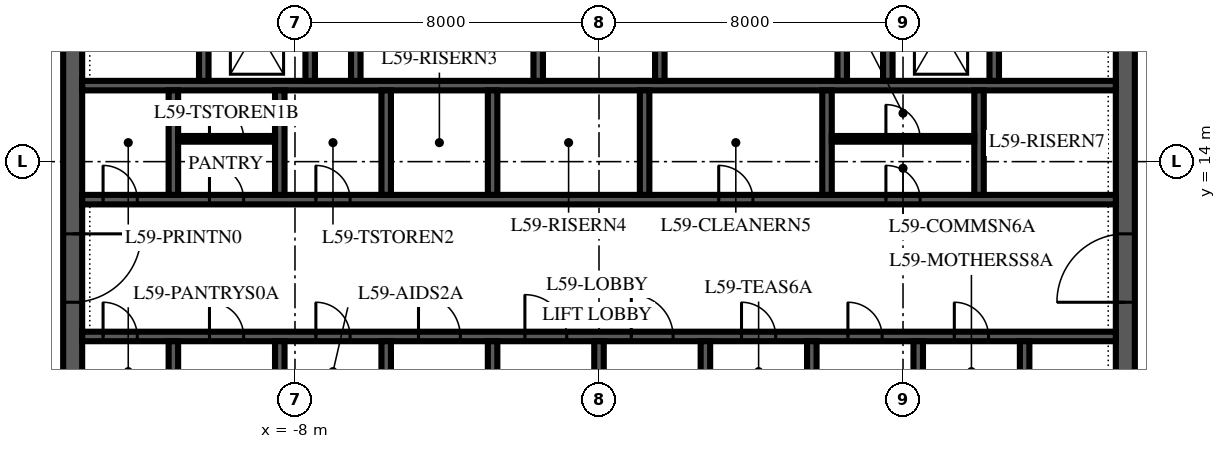
"""IFC4 building model, lengths in metres.
Left out: names, types, materials, properties, quantities, classifications, styles, units other than length and angle.
Written with IfcOpenShell. Run it as: python <this file> out.ifc"""

import sys

from ifc_helpers import new_model, si_unit, direction, frame, frame_2d, origin, place, context, subcontext, project, spatial, polyline, rectangle, outline, extrude, element, fill, save


model = new_model("IFC4")
c1 = context("Model", 3, precision=1e-05, world=origin(), true_north=direction((0.0, 1.0)))
c2 = subcontext(c1, "Body", "Model", "MODEL_VIEW")
j1 = project(units=[si_unit("LENGTHUNIT", "METRE"), si_unit("PLANEANGLEUNIT", "RADIAN")], contexts=[c1])
p1 = place(None, origin())
s1 = spatial("IfcSite", under=j1, at=p1, CompositionType="ELEMENT")
p2 = place(p1, origin())
s2 = spatial("IfcBuilding", under=s1, at=p2, CompositionType="ELEMENT")
p3 = place(p2, frame((0.0, 0.0, 256.0)))
s3 = spatial("IfcBuildingStorey", under=s2, at=p3, CompositionType="ELEMENT", Elevation=256.0)
p4 = place(p3, frame((13.85, 6.15, 0.0), z_axis=(0.0, 0.0, 1.0), x_axis=(0.0, 1.0, 0.0)))
e1 = element("IfcWall", 1, at=p4, inside=s3, PredefinedType="SHEAR", context=c2, shape_type="SweptSolid", body=[
    extrude(outline(polyline([(0.0, -0.25), (17.7, -0.25), (17.7, 0.0), (17.45, 0.0), (17.45, 0.25), (0.25, 0.25), (0.25, 0.0), (0.0, 0.0), (0.0, -0.25)])), origin(), (0.0, 0.0, 1.0), 4.0),
])
p5 = place(p4, frame((4.15, 0.0, 0.0)))
e2 = element("IfcOpeningElement", 2, at=p5, cuts=e1, PredefinedType="OPENING", context=c2, shape_type="SweptSolid", body=[
    extrude(rectangle(XDim=1.8, YDim=2.4, at=frame_2d((0.9, 1.2))), frame((0.0, 0.265, 0.0), z_axis=(0.0, -1.0, 0.0), x_axis=(1.0, 0.0, 0.0)), (0.0, 0.0, 1.0), 0.53),
])
p6 = place(p3, frame((-13.85, 23.85, 0.0), z_axis=(0.0, 0.0, 1.0), x_axis=(0.0, -1.0, 0.0)))
e3 = element("IfcWall", 3, at=p6, inside=s3, PredefinedType="SHEAR", context=c2, shape_type="SweptSolid", body=[
    extrude(outline(polyline([(0.0, -0.25), (17.7, -0.25), (17.7, 0.0), (17.45, 0.0), (17.45, 0.25), (0.25, 0.25), (0.25, 0.0), (0.0, 0.0), (0.0, -0.25)])), origin(), (0.0, 0.0, 1.0), 4.0),
])
p7 = place(p6, frame((11.75, 0.0, 0.0)))
e4 = element("IfcOpeningElement", 4, at=p7, cuts=e3, PredefinedType="OPENING", context=c2, shape_type="SweptSolid", body=[
    extrude(rectangle(XDim=1.8, YDim=2.4, at=frame_2d((0.9, 1.2))), frame((0.0, 0.265, 0.0), z_axis=(0.0, -1.0, 0.0), x_axis=(1.0, 0.0, 0.0)), (0.0, 0.0, 1.0), 0.53),
])
p8 = place(p3, frame((-13.6, 9.4, 0.0), z_axis=(0.0, 0.0, 1.0), x_axis=(1.0, 0.0, 0.0)))
e5 = element("IfcWall", 5, at=p8, inside=s3, PredefinedType="SHEAR", context=c2, shape_type="SweptSolid", body=[
    extrude(rectangle(XDim=27.2, YDim=0.25, at=frame_2d((13.6, 0.0))), origin(), (0.0, 0.0, 1.0), 4.0),
])
p9 = place(p8, frame((8.85, 0.0, 0.0)))
e6 = element("IfcOpeningElement", 6, at=p9, cuts=e5, PredefinedType="OPENING", context=c2, shape_type="SweptSolid", body=[
    extrude(rectangle(XDim=1.1, YDim=2.1, at=frame_2d((0.55, 1.05))), frame((0.0, 0.14, 0.0), z_axis=(0.0, -1.0, 0.0), x_axis=(1.0, 0.0, 0.0)), (0.0, 0.0, 1.0), 0.28),
])
p10 = place(p8, frame((11.65, 0.0, 0.0)))
e7 = element("IfcOpeningElement", 7, at=p10, cuts=e5, PredefinedType="OPENING", context=c2, shape_type="SweptSolid", body=[
    extrude(rectangle(XDim=1.1, YDim=2.1, at=frame_2d((0.55, 1.05))), frame((0.0, 0.14, 0.0), z_axis=(0.0, -1.0, 0.0), x_axis=(1.0, 0.0, 0.0)), (0.0, 0.0, 1.0), 0.28),
])
p11 = place(p8, frame((14.45, 0.0, 0.0)))
e8 = element("IfcOpeningElement", 8, at=p11, cuts=e5, PredefinedType="OPENING", context=c2, shape_type="SweptSolid", body=[
    extrude(rectangle(XDim=1.1, YDim=2.1, at=frame_2d((0.55, 1.05))), frame((0.0, 0.14, 0.0), z_axis=(0.0, -1.0, 0.0), x_axis=(1.0, 0.0, 0.0)), (0.0, 0.0, 1.0), 0.28),
])
p12 = place(p8, frame((0.55, 0.0, 0.0)))
e9 = element("IfcOpeningElement", 9, at=p12, cuts=e5, PredefinedType="OPENING", context=c2, shape_type="SweptSolid", body=[
    extrude(rectangle(XDim=0.9, YDim=2.1, at=frame_2d((0.45, 1.05))), frame((0.0, 0.14, 0.0), z_axis=(0.0, -1.0, 0.0), x_axis=(1.0, 0.0, 0.0)), (0.0, 0.0, 1.0), 0.28),
])
p13 = place(p8, frame((3.35, 0.0, 0.0)))
e10 = element("IfcOpeningElement", 10, at=p13, cuts=e5, PredefinedType="OPENING", context=c2, shape_type="SweptSolid", body=[
    extrude(rectangle(XDim=0.9, YDim=2.1, at=frame_2d((0.45, 1.05))), frame((0.0, 0.14, 0.0), z_axis=(0.0, -1.0, 0.0), x_axis=(1.0, 0.0, 0.0)), (0.0, 0.0, 1.0), 0.28),
])
p14 = place(p8, frame((6.15, 0.0, 0.0)))
e11 = element("IfcOpeningElement", 11, at=p14, cuts=e5, PredefinedType="OPENING", context=c2, shape_type="SweptSolid", body=[
    extrude(rectangle(XDim=0.9, YDim=2.1, at=frame_2d((0.45, 1.05))), frame((0.0, 0.14, 0.0), z_axis=(0.0, -1.0, 0.0), x_axis=(1.0, 0.0, 0.0)), (0.0, 0.0, 1.0), 0.28),
])
p15 = place(p8, frame((17.35, 0.0, 0.0)))
e12 = element("IfcOpeningElement", 12, at=p15, cuts=e5, PredefinedType="OPENING", context=c2, shape_type="SweptSolid", body=[
    extrude(rectangle(XDim=0.9, YDim=2.1, at=frame_2d((0.45, 1.05))), frame((0.0, 0.14, 0.0), z_axis=(0.0, -1.0, 0.0), x_axis=(1.0, 0.0, 0.0)), (0.0, 0.0, 1.0), 0.28),
])
p16 = place(p8, frame((20.15, 0.0, 0.0)))
e13 = element("IfcOpeningElement", 13, at=p16, cuts=e5, PredefinedType="OPENING", context=c2, shape_type="SweptSolid", body=[
    extrude(rectangle(XDim=0.9, YDim=2.1, at=frame_2d((0.45, 1.05))), frame((0.0, 0.14, 0.0), z_axis=(0.0, -1.0, 0.0), x_axis=(1.0, 0.0, 0.0)), (0.0, 0.0, 1.0), 0.28),
])
p17 = place(p8, frame((22.95, 0.0, 0.0)))
e14 = element("IfcOpeningElement", 14, at=p17, cuts=e5, PredefinedType="OPENING", context=c2, shape_type="SweptSolid", body=[
    extrude(rectangle(XDim=0.9, YDim=2.1, at=frame_2d((0.45, 1.05))), frame((0.0, 0.14, 0.0), z_axis=(0.0, -1.0, 0.0), x_axis=(1.0, 0.0, 0.0)), (0.0, 0.0, 1.0), 0.28),
])
p18 = place(p3, frame((-13.6, 13.0, 0.0), z_axis=(0.0, 0.0, 1.0), x_axis=(1.0, 0.0, 0.0)))
e15 = element("IfcWall", 15, at=p18, inside=s3, PredefinedType="SHEAR", context=c2, shape_type="SweptSolid", body=[
    extrude(rectangle(XDim=27.2, YDim=0.25, at=frame_2d((13.6, 0.0))), origin(), (0.0, 0.0, 1.0), 4.0),
])
p19 = place(p18, frame((16.75, 0.0, 0.0)))
e16 = element("IfcOpeningElement", 16, at=p19, cuts=e15, PredefinedType="OPENING", context=c2, shape_type="SweptSolid", body=[
    extrude(rectangle(XDim=0.9, YDim=2.1, at=frame_2d((0.45, 1.05))), frame((0.0, 0.14, 0.0), z_axis=(0.0, -1.0, 0.0), x_axis=(1.0, 0.0, 0.0)), (0.0, 0.0, 1.0), 0.28),
])
p20 = place(p18, frame((21.15, 0.0, 0.0)))
e17 = element("IfcOpeningElement", 17, at=p20, cuts=e15, PredefinedType="OPENING", context=c2, shape_type="SweptSolid", body=[
    extrude(rectangle(XDim=0.9, YDim=2.1, at=frame_2d((0.45, 1.05))), frame((0.0, 0.14, 0.0), z_axis=(0.0, -1.0, 0.0), x_axis=(1.0, 0.0, 0.0)), (0.0, 0.0, 1.0), 0.28),
])
p21 = place(p18, frame((0.55, 0.0, 0.0)))
e18 = element("IfcOpeningElement", 18, at=p21, cuts=e15, PredefinedType="OPENING", context=c2, shape_type="SweptSolid", body=[
    extrude(rectangle(XDim=0.9, YDim=2.1, at=frame_2d((0.45, 1.05))), frame((0.0, 0.14, 0.0), z_axis=(0.0, -1.0, 0.0), x_axis=(1.0, 0.0, 0.0)), (0.0, 0.0, 1.0), 0.28),
])
p22 = place(p18, frame((3.35, 0.0, 0.0)))
e19 = element("IfcOpeningElement", 19, at=p22, cuts=e15, PredefinedType="OPENING", context=c2, shape_type="SweptSolid", body=[
    extrude(rectangle(XDim=0.9, YDim=2.1, at=frame_2d((0.45, 1.05))), frame((0.0, 0.14, 0.0), z_axis=(0.0, -1.0, 0.0), x_axis=(1.0, 0.0, 0.0)), (0.0, 0.0, 1.0), 0.28),
])
p23 = place(p18, frame((6.15, 0.0, 0.0)))
e20 = element("IfcOpeningElement", 20, at=p23, cuts=e15, PredefinedType="OPENING", context=c2, shape_type="SweptSolid", body=[
    extrude(rectangle(XDim=0.9, YDim=2.1, at=frame_2d((0.45, 1.05))), frame((0.0, 0.14, 0.0), z_axis=(0.0, -1.0, 0.0), x_axis=(1.0, 0.0, 0.0)), (0.0, 0.0, 1.0), 0.28),
])
p24 = place(p3, frame((-13.6, 16.0, 0.0), z_axis=(0.0, 0.0, 1.0), x_axis=(1.0, 0.0, 0.0)))
e21 = element("IfcWall", 21, at=p24, inside=s3, PredefinedType="SHEAR", context=c2, shape_type="SweptSolid", body=[
    extrude(rectangle(XDim=27.2, YDim=0.25, at=frame_2d((13.6, 0.0))), origin(), (0.0, 0.0, 1.0), 4.0),
])
for number, where, z_axis, x_axis in (
    (22, (-11.2, 6.4, 0.0), (0.0, 0.0, 1.0), (0.0, 1.0, 0.0)),
    (23, (-8.4, 6.4, 0.0), (0.0, 0.0, 1.0), (0.0, 1.0, 0.0)),
    (24, (-5.6, 6.4, 0.0), (0.0, 0.0, 1.0), (0.0, 1.0, 0.0)),
    (25, (-2.8, 6.4, 0.0), (0.0, 0.0, 1.0), (0.0, 1.0, 0.0)),
    (26, (0.0, 6.4, 0.0), (0.0, 0.0, 1.0), (0.0, 1.0, 0.0)),
    (27, (2.8, 6.4, 0.0), (0.0, 0.0, 1.0), (0.0, 1.0, 0.0)),
    (28, (5.6, 6.4, 0.0), (0.0, 0.0, 1.0), (0.0, 1.0, 0.0)),
    (29, (8.4, 6.4, 0.0), (0.0, 0.0, 1.0), (0.0, 1.0, 0.0)),
    (30, (11.2, 6.4, 0.0), (0.0, 0.0, 1.0), (0.0, 1.0, 0.0)),
):
    element("IfcWall", number, at=place(p3, frame(where, z_axis=z_axis, x_axis=x_axis)), inside=s3, PredefinedType="SHEAR", context=c2, shape_type="SweptSolid", body=[
        extrude(rectangle(XDim=2.875, YDim=0.25, at=frame_2d((1.438, 0.0))), origin(), (0.0, 0.0, 1.0), 4.0),
    ])
for number, where, z_axis, x_axis in (
    (31, (-11.2, 13.125, 0.0), (0.0, 0.0, 1.0), (0.0, 1.0, 0.0)),
    (32, (-8.4, 13.125, 0.0), (0.0, 0.0, 1.0), (0.0, 1.0, 0.0)),
    (33, (-5.6, 13.125, 0.0), (0.0, 0.0, 1.0), (0.0, 1.0, 0.0)),
    (34, (-2.8, 13.125, 0.0), (0.0, 0.0, 1.0), (0.0, 1.0, 0.0)),
    (35, (1.2, 13.125, 0.0), (0.0, 0.0, 1.0), (0.0, 1.0, 0.0)),
    (36, (6.0, 13.125, 0.0), (0.0, 0.0, 1.0), (0.0, 1.0, 0.0)),
    (37, (10.0, 13.125, 0.0), (0.0, 0.0, 1.0), (0.0, 1.0, 0.0)),
):
    element("IfcWall", number, at=place(p3, frame(where, z_axis=z_axis, x_axis=x_axis)), inside=s3, PredefinedType="SHEAR", context=c2, shape_type="SweptSolid", body=[
        extrude(rectangle(XDim=2.75, YDim=0.25, at=frame_2d((1.375, 0.0))), origin(), (0.0, 0.0, 1.0), 4.0),
    ])
p25 = place(p3, frame((-10.4, 16.125, 0.0), z_axis=(0.0, 0.0, 1.0), x_axis=(0.0, 1.0, 0.0)))
e38 = element("IfcWall", 38, at=p25, inside=s3, PredefinedType="SHEAR", context=c2, shape_type="SweptSolid", body=[
    extrude(rectangle(XDim=7.475, YDim=0.25, at=frame_2d((3.738, 0.0))), origin(), (0.0, 0.0, 1.0), 4.0),
])
p26 = place(p25, frame((6.275, 0.0, 0.0)))
e39 = element("IfcOpeningElement", 39, at=p26, cuts=e38, PredefinedType="OPENING", context=c2, shape_type="SweptSolid", body=[
    extrude(rectangle(XDim=1.0, YDim=2.1, at=frame_2d((0.5, 1.05))), frame((0.0, 0.14, 0.0), z_axis=(0.0, -1.0, 0.0), x_axis=(1.0, 0.0, 0.0)), (0.0, 0.0, 1.0), 0.28),
])
for number, where, z_axis, x_axis in (
    (40, (-6.4, 16.125, 0.0), (0.0, 0.0, 1.0), (0.0, 1.0, 0.0)),
    (41, (-1.6, 16.125, 0.0), (0.0, 0.0, 1.0), (0.0, 1.0, 0.0)),
    (42, (1.6, 16.125, 0.0), (0.0, 0.0, 1.0), (0.0, 1.0, 0.0)),
    (43, (6.4, 16.125, 0.0), (0.0, 0.0, 1.0), (0.0, 1.0, 0.0)),
):
    element("IfcWall", number, at=place(p3, frame(where, z_axis=z_axis, x_axis=x_axis)), inside=s3, PredefinedType="SHEAR", context=c2, shape_type="SweptSolid", body=[
        extrude(rectangle(XDim=7.475, YDim=0.25, at=frame_2d((3.738, 0.0))), origin(), (0.0, 0.0, 1.0), 4.0),
    ])
p27 = place(p3, frame((10.4, 16.125, 0.0), z_axis=(0.0, 0.0, 1.0), x_axis=(0.0, 1.0, 0.0)))
e44 = element("IfcWall", 44, at=p27, inside=s3, PredefinedType="SHEAR", context=c2, shape_type="SweptSolid", body=[
    extrude(rectangle(XDim=7.475, YDim=0.25, at=frame_2d((3.738, 0.0))), origin(), (0.0, 0.0, 1.0), 4.0),
])
p28 = place(p27, frame((6.275, 0.0, 0.0)))
e45 = element("IfcOpeningElement", 45, at=p28, cuts=e44, PredefinedType="OPENING", context=c2, shape_type="SweptSolid", body=[
    extrude(rectangle(XDim=1.0, YDim=2.1, at=frame_2d((0.5, 1.05))), frame((0.0, 0.14, 0.0), z_axis=(0.0, -1.0, 0.0), x_axis=(1.0, 0.0, 0.0)), (0.0, 0.0, 1.0), 0.28),
])
for number, where, z_axis, x_axis in (
    (46, (-7.6, 16.125, 0.0), (0.0, 0.0, 1.0), (0.0, 1.0, 0.0)),
    (47, (7.6, 16.125, 0.0), (0.0, 0.0, 1.0), (0.0, 1.0, 0.0)),
):
    element("IfcWall", number, at=place(p3, frame(where, z_axis=z_axis, x_axis=x_axis)), inside=s3, PredefinedType="SHEAR", context=c2, shape_type="SweptSolid", body=[
        extrude(rectangle(XDim=2.75, YDim=0.25, at=frame_2d((1.375, 0.0))), origin(), (0.0, 0.0, 1.0), 4.0),
    ])
p29 = place(p3, frame((6.125, 14.6, 0.0), z_axis=(0.0, 0.0, 1.0), x_axis=(1.0, 0.0, 0.0)))
e48 = element("IfcWall", 48, at=p29, inside=s3, PredefinedType="PARTITIONING", context=c2, shape_type="SweptSolid", body=[
    extrude(rectangle(XDim=3.75, YDim=0.15, at=frame_2d((1.875, 0.0))), origin(), (0.0, 0.0, 1.0), 3.85),
])
p30 = place(p29, frame((1.425, 0.0, 0.0)))
e49 = element("IfcOpeningElement", 49, at=p30, cuts=e48, PredefinedType="OPENING", context=c2, shape_type="SweptSolid", body=[
    extrude(rectangle(XDim=0.9, YDim=2.1, at=frame_2d((0.45, 1.05))), frame((0.0, 0.09, 0.0), z_axis=(0.0, -1.0, 0.0), x_axis=(1.0, 0.0, 0.0)), (0.0, 0.0, 1.0), 0.18),
])
p31 = place(p3, frame((-11.075, 14.6, 0.0), z_axis=(0.0, 0.0, 1.0), x_axis=(1.0, 0.0, 0.0)))
e50 = element("IfcWall", 50, at=p31, inside=s3, PredefinedType="PARTITIONING", context=c2, shape_type="SweptSolid", body=[
    extrude(rectangle(XDim=2.55, YDim=0.15, at=frame_2d((1.275, 0.0))), origin(), (0.0, 0.0, 1.0), 3.85),
])
p32 = place(p31, frame((0.825, 0.0, 0.0)))
e51 = element("IfcOpeningElement", 51, at=p32, cuts=e50, PredefinedType="OPENING", context=c2, shape_type="SweptSolid", body=[
    extrude(rectangle(XDim=0.9, YDim=2.1, at=frame_2d((0.45, 1.05))), frame((0.0, 0.09, 0.0), z_axis=(0.0, -1.0, 0.0), x_axis=(1.0, 0.0, 0.0)), (0.0, 0.0, 1.0), 0.18),
])
p33 = place(p5, origin())
e52 = element("IfcDoor", 52, at=p33, inside=s3, OperationType="DOUBLE_DOOR_SINGLE_SWING", PredefinedType="DOOR", context=c2, shape_type="SweptSolid", body=[
    extrude(rectangle(XDim=1.8, YDim=2.4, at=frame_2d((0.9, 1.2))), frame((0.0, 0.25, 0.0), z_axis=(0.0, -1.0, 0.0), x_axis=(1.0, 0.0, 0.0)), (0.0, 0.0, 1.0), 0.5),
])
fill(e2, e52)
p34 = place(p7, origin())
e53 = element("IfcDoor", 53, at=p34, inside=s3, OperationType="DOUBLE_DOOR_SINGLE_SWING", PredefinedType="DOOR", context=c2, shape_type="SweptSolid", body=[
    extrude(rectangle(XDim=1.8, YDim=2.4, at=frame_2d((0.9, 1.2))), frame((0.0, 0.25, 0.0), z_axis=(0.0, -1.0, 0.0), x_axis=(1.0, 0.0, 0.0)), (0.0, 0.0, 1.0), 0.5),
])
fill(e4, e53)
p35 = place(p9, origin())
e54 = element("IfcDoor", 54, at=p35, inside=s3, OperationType="SLIDING_TO_LEFT", PredefinedType="DOOR", context=c2, shape_type="SweptSolid", body=[
    extrude(rectangle(XDim=1.1, YDim=2.1, at=frame_2d((0.55, 1.05))), frame((0.0, 0.125, 0.0), z_axis=(0.0, -1.0, 0.0), x_axis=(1.0, 0.0, 0.0)), (0.0, 0.0, 1.0), 0.25),
])
fill(e6, e54)
p36 = place(p10, origin())
e55 = element("IfcDoor", 55, at=p36, inside=s3, OperationType="SLIDING_TO_LEFT", PredefinedType="DOOR", context=c2, shape_type="SweptSolid", body=[
    extrude(rectangle(XDim=1.1, YDim=2.1, at=frame_2d((0.55, 1.05))), frame((0.0, 0.125, 0.0), z_axis=(0.0, -1.0, 0.0), x_axis=(1.0, 0.0, 0.0)), (0.0, 0.0, 1.0), 0.25),
])
fill(e7, e55)
p37 = place(p11, origin())
e56 = element("IfcDoor", 56, at=p37, inside=s3, OperationType="SLIDING_TO_LEFT", PredefinedType="DOOR", context=c2, shape_type="SweptSolid", body=[
    extrude(rectangle(XDim=1.1, YDim=2.1, at=frame_2d((0.55, 1.05))), frame((0.0, 0.125, 0.0), z_axis=(0.0, -1.0, 0.0), x_axis=(1.0, 0.0, 0.0)), (0.0, 0.0, 1.0), 0.25),
])
fill(e8, e56)
p38 = place(p19, origin())
e57 = element("IfcDoor", 57, at=p38, inside=s3, OperationType="SINGLE_SWING_LEFT", PredefinedType="DOOR", context=c2, shape_type="SweptSolid", body=[
    extrude(rectangle(XDim=0.9, YDim=2.1, at=frame_2d((0.45, 1.05))), frame((0.0, 0.125, 0.0), z_axis=(0.0, -1.0, 0.0), x_axis=(1.0, 0.0, 0.0)), (0.0, 0.0, 1.0), 0.25),
])
fill(e16, e57)
p39 = place(p20, origin())
e58 = element("IfcDoor", 58, at=p39, inside=s3, OperationType="SINGLE_SWING_LEFT", PredefinedType="DOOR", context=c2, shape_type="SweptSolid", body=[
    extrude(rectangle(XDim=0.9, YDim=2.1, at=frame_2d((0.45, 1.05))), frame((0.0, 0.125, 0.0), z_axis=(0.0, -1.0, 0.0), x_axis=(1.0, 0.0, 0.0)), (0.0, 0.0, 1.0), 0.25),
])
fill(e17, e58)
p40 = place(p30, origin())
e59 = element("IfcDoor", 59, at=p40, inside=s3, OperationType="SINGLE_SWING_LEFT", PredefinedType="DOOR", context=c2, shape_type="SweptSolid", body=[
    extrude(rectangle(XDim=0.9, YDim=2.1, at=frame_2d((0.45, 1.05))), frame((0.0, 0.075, 0.0), z_axis=(0.0, -1.0, 0.0), x_axis=(1.0, 0.0, 0.0)), (0.0, 0.0, 1.0), 0.149),
])
fill(e49, e59)
p41 = place(p21, origin())
e60 = element("IfcDoor", 60, at=p41, inside=s3, OperationType="SINGLE_SWING_LEFT", PredefinedType="DOOR", context=c2, shape_type="SweptSolid", body=[
    extrude(rectangle(XDim=0.9, YDim=2.1, at=frame_2d((0.45, 1.05))), frame((0.0, 0.125, 0.0), z_axis=(0.0, -1.0, 0.0), x_axis=(1.0, 0.0, 0.0)), (0.0, 0.0, 1.0), 0.25),
])
fill(e18, e60)
p42 = place(p22, origin())
e61 = element("IfcDoor", 61, at=p42, inside=s3, OperationType="SINGLE_SWING_LEFT", PredefinedType="DOOR", context=c2, shape_type="SweptSolid", body=[
    extrude(rectangle(XDim=0.9, YDim=2.1, at=frame_2d((0.45, 1.05))), frame((0.0, 0.125, 0.0), z_axis=(0.0, -1.0, 0.0), x_axis=(1.0, 0.0, 0.0)), (0.0, 0.0, 1.0), 0.25),
])
fill(e19, e61)
p43 = place(p32, origin())
e62 = element("IfcDoor", 62, at=p43, inside=s3, OperationType="SINGLE_SWING_LEFT", PredefinedType="DOOR", context=c2, shape_type="SweptSolid", body=[
    extrude(rectangle(XDim=0.9, YDim=2.1, at=frame_2d((0.45, 1.05))), frame((0.0, 0.075, 0.0), z_axis=(0.0, -1.0, 0.0), x_axis=(1.0, 0.0, 0.0)), (0.0, 0.0, 1.0), 0.149),
])
fill(e51, e62)
p44 = place(p23, origin())
e63 = element("IfcDoor", 63, at=p44, inside=s3, OperationType="SINGLE_SWING_LEFT", PredefinedType="DOOR", context=c2, shape_type="SweptSolid", body=[
    extrude(rectangle(XDim=0.9, YDim=2.1, at=frame_2d((0.45, 1.05))), frame((0.0, 0.125, 0.0), z_axis=(0.0, -1.0, 0.0), x_axis=(1.0, 0.0, 0.0)), (0.0, 0.0, 1.0), 0.25),
])
fill(e20, e63)
p45 = place(p12, origin())
e64 = element("IfcDoor", 64, at=p45, inside=s3, OperationType="SINGLE_SWING_LEFT", PredefinedType="DOOR", context=c2, shape_type="SweptSolid", body=[
    extrude(rectangle(XDim=0.9, YDim=2.1, at=frame_2d((0.45, 1.05))), frame((0.0, 0.125, 0.0), z_axis=(0.0, -1.0, 0.0), x_axis=(1.0, 0.0, 0.0)), (0.0, 0.0, 1.0), 0.25),
])
fill(e9, e64)
p46 = place(p13, origin())
e65 = element("IfcDoor", 65, at=p46, inside=s3, OperationType="SINGLE_SWING_LEFT", PredefinedType="DOOR", context=c2, shape_type="SweptSolid", body=[
    extrude(rectangle(XDim=0.9, YDim=2.1, at=frame_2d((0.45, 1.05))), frame((0.0, 0.125, 0.0), z_axis=(0.0, -1.0, 0.0), x_axis=(1.0, 0.0, 0.0)), (0.0, 0.0, 1.0), 0.25),
])
fill(e10, e65)
p47 = place(p14, origin())
e66 = element("IfcDoor", 66, at=p47, inside=s3, OperationType="SINGLE_SWING_LEFT", PredefinedType="DOOR", context=c2, shape_type="SweptSolid", body=[
    extrude(rectangle(XDim=0.9, YDim=2.1, at=frame_2d((0.45, 1.05))), frame((0.0, 0.125, 0.0), z_axis=(0.0, -1.0, 0.0), x_axis=(1.0, 0.0, 0.0)), (0.0, 0.0, 1.0), 0.25),
])
fill(e11, e66)
p48 = place(p15, origin())
e67 = element("IfcDoor", 67, at=p48, inside=s3, OperationType="SINGLE_SWING_LEFT", PredefinedType="DOOR", context=c2, shape_type="SweptSolid", body=[
    extrude(rectangle(XDim=0.9, YDim=2.1, at=frame_2d((0.45, 1.05))), frame((0.0, 0.125, 0.0), z_axis=(0.0, -1.0, 0.0), x_axis=(1.0, 0.0, 0.0)), (0.0, 0.0, 1.0), 0.25),
])
fill(e12, e67)
p49 = place(p16, origin())
e68 = element("IfcDoor", 68, at=p49, inside=s3, OperationType="SINGLE_SWING_LEFT", PredefinedType="DOOR", context=c2, shape_type="SweptSolid", body=[
    extrude(rectangle(XDim=0.9, YDim=2.1, at=frame_2d((0.45, 1.05))), frame((0.0, 0.125, 0.0), z_axis=(0.0, -1.0, 0.0), x_axis=(1.0, 0.0, 0.0)), (0.0, 0.0, 1.0), 0.25),
])
fill(e13, e68)
p50 = place(p17, origin())
e69 = element("IfcDoor", 69, at=p50, inside=s3, OperationType="SINGLE_SWING_LEFT", PredefinedType="DOOR", context=c2, shape_type="SweptSolid", body=[
    extrude(rectangle(XDim=0.9, YDim=2.1, at=frame_2d((0.45, 1.05))), frame((0.0, 0.125, 0.0), z_axis=(0.0, -1.0, 0.0), x_axis=(1.0, 0.0, 0.0)), (0.0, 0.0, 1.0), 0.25),
])
fill(e14, e69)
save(model, sys.argv[1])
